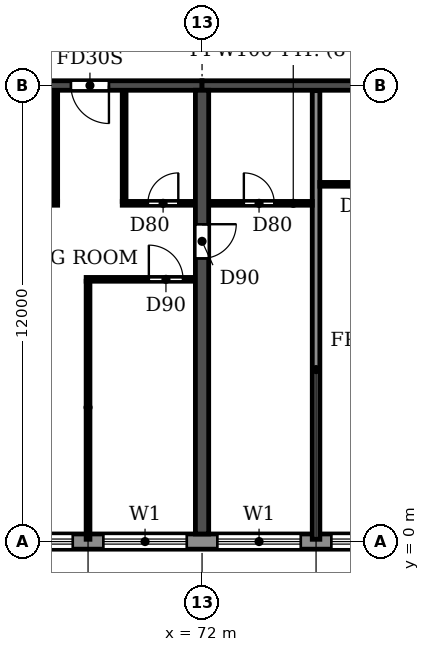
"""IFC4 building model, lengths in metres.
Left out: names, types, materials, properties, quantities, classifications, styles, units other than length and angle.
Written with IfcOpenShell. Run it as: python <this file> out.ifc"""

import sys

from ifc_helpers import new_model, si_unit, direction, frame, frame_2d, origin, place, context, subcontext, project, spatial, rectangle, extrude, element, fill, save


model = new_model("IFC4")
c1 = context("Model", 3, precision=1e-05, world=origin(), true_north=direction((0.0, 1.0)))
c2 = subcontext(c1, "Body", "Model", "MODEL_VIEW")
j1 = project(units=[si_unit("LENGTHUNIT", "METRE"), si_unit("PLANEANGLEUNIT", "RADIAN")], contexts=[c1])
p1 = place(None, origin())
s1 = spatial("IfcSite", under=j1, at=p1, CompositionType="ELEMENT")
p2 = place(p1, origin())
s2 = spatial("IfcBuilding", under=s1, at=p2, CompositionType="ELEMENT")
p3 = place(p2, frame((0.0, 0.0, 102.6)))
s3 = spatial("IfcBuildingStorey", under=s2, at=p3, CompositionType="ELEMENT", Elevation=102.6)
p4 = place(p3, frame((72.0, 0.2, 0.0), z_axis=(0.0, 0.0, 1.0), x_axis=(0.0, 1.0, 0.0)))
e1 = element("IfcWall", 1, at=p4, inside=s3, PredefinedType="SHEAR", context=c2, shape_type="SweptSolid", body=[
    extrude(rectangle(XDim=11.675, YDim=0.35, at=frame_2d((5.837, 0.0))), origin(), (0.0, 0.0, 1.0), 3.0),
])
p5 = place(p4, frame((7.25, 0.0, 0.0)))
e2 = element("IfcOpeningElement", 2, at=p5, cuts=e1, PredefinedType="OPENING", context=c2, shape_type="SweptSolid", body=[
    extrude(rectangle(XDim=0.9, YDim=2.1, at=frame_2d((0.45, 1.05))), frame((0.0, 0.185, 0.0), z_axis=(0.0, -1.0, 0.0), x_axis=(1.0, 0.0, 0.0)), (0.0, 0.0, 1.0), 0.37),
])
p6 = place(p3, frame((66.0, 12.0, 0.0), z_axis=(0.0, 0.0, 1.0), x_axis=(1.0, 0.0, 0.0)))
e3 = element("IfcWall", 3, at=p6, inside=s3, PredefinedType="SHEAR", context=c2, shape_type="SweptSolid", body=[
    extrude(rectangle(XDim=6.0, YDim=0.25, at=frame_2d((3.0, 0.0))), origin(), (0.0, 0.0, 1.0), 2.4),
])
p7 = place(p6, frame((2.55, 0.0, 0.0)))
e4 = element("IfcOpeningElement", 4, at=p7, cuts=e3, PredefinedType="OPENING", context=c2, shape_type="SweptSolid", body=[
    extrude(rectangle(XDim=1.0, YDim=2.1, at=frame_2d((0.5, 1.05))), frame((0.0, 0.135, 0.0), z_axis=(0.0, -1.0, 0.0), x_axis=(1.0, 0.0, 0.0)), (0.0, 0.0, 1.0), 0.27),
])
p8 = place(p3, frame((72.0, 12.0, 0.0), z_axis=(0.0, 0.0, 1.0), x_axis=(1.0, 0.0, 0.0)))
e5 = element("IfcWall", 5, at=p8, inside=s3, PredefinedType="SHEAR", context=c2, shape_type="SweptSolid", body=[
    extrude(rectangle(XDim=6.0, YDim=0.25, at=frame_2d((3.0, 0.0))), origin(), (0.0, 0.0, 1.0), 2.4),
])
p9 = place(p3, frame((10.683, 0.0, 0.0), z_axis=(0.0, 0.0, 1.0), x_axis=(1.0, 0.0, 0.0)))
e6 = element("IfcWall", 6, at=p9, inside=s3, PredefinedType="STANDARD", context=c2, shape_type="SweptSolid", body=[
    extrude(rectangle(XDim=80.634, YDim=0.4, at=frame_2d((40.317, 0.0))), origin(), (0.0, 0.0, 1.0), 3.0),
])
p10 = place(p9, frame((1.717, 0.0, 0.9)))
e7 = element("IfcOpeningElement", 7, at=p10, cuts=e6, PredefinedType="OPENING", context=c2, shape_type="SweptSolid", body=[
    extrude(rectangle(XDim=2.2, YDim=1.5, at=frame_2d((1.1, 0.75))), frame((0.0, 0.21, 0.0), z_axis=(0.0, -1.0, 0.0), x_axis=(1.0, 0.0, 0.0)), (0.0, 0.0, 1.0), 0.42),
])
p11 = place(p9, frame((4.917, 0.0, 0.0)))
e8 = element("IfcOpeningElement", 8, at=p11, cuts=e6, PredefinedType="OPENING", context=c2, shape_type="SweptSolid", body=[
    extrude(rectangle(XDim=1.8, YDim=2.4, at=frame_2d((0.9, 1.2))), frame((0.0, 0.21, 0.0), z_axis=(0.0, -1.0, 0.0), x_axis=(1.0, 0.0, 0.0)), (0.0, 0.0, 1.0), 0.42),
])
p12 = place(p9, frame((7.717, 0.0, 0.9)))
e9 = element("IfcOpeningElement", 9, at=p12, cuts=e6, PredefinedType="OPENING", context=c2, shape_type="SweptSolid", body=[
    extrude(rectangle(XDim=2.2, YDim=1.5, at=frame_2d((1.1, 0.75))), frame((0.0, 0.21, 0.0), z_axis=(0.0, -1.0, 0.0), x_axis=(1.0, 0.0, 0.0)), (0.0, 0.0, 1.0), 0.42),
])
p13 = place(p9, frame((10.717, 0.0, 0.9)))
e10 = element("IfcOpeningElement", 10, at=p13, cuts=e6, PredefinedType="OPENING", context=c2, shape_type="SweptSolid", body=[
    extrude(rectangle(XDim=2.2, YDim=1.5, at=frame_2d((1.1, 0.75))), frame((0.0, 0.21, 0.0), z_axis=(0.0, -1.0, 0.0), x_axis=(1.0, 0.0, 0.0)), (0.0, 0.0, 1.0), 0.42),
])
p14 = place(p9, frame((13.717, 0.0, 0.9)))
e11 = element("IfcOpeningElement", 11, at=p14, cuts=e6, PredefinedType="OPENING", context=c2, shape_type="SweptSolid", body=[
    extrude(rectangle(XDim=2.2, YDim=1.5, at=frame_2d((1.1, 0.75))), frame((0.0, 0.21, 0.0), z_axis=(0.0, -1.0, 0.0), x_axis=(1.0, 0.0, 0.0)), (0.0, 0.0, 1.0), 0.42),
])
p15 = place(p9, frame((16.717, 0.0, 0.9)))
e12 = element("IfcOpeningElement", 12, at=p15, cuts=e6, PredefinedType="OPENING", context=c2, shape_type="SweptSolid", body=[
    extrude(rectangle(XDim=2.2, YDim=1.5, at=frame_2d((1.1, 0.75))), frame((0.0, 0.21, 0.0), z_axis=(0.0, -1.0, 0.0), x_axis=(1.0, 0.0, 0.0)), (0.0, 0.0, 1.0), 0.42),
])
p16 = place(p9, frame((19.717, 0.0, 0.9)))
e13 = element("IfcOpeningElement", 13, at=p16, cuts=e6, PredefinedType="OPENING", context=c2, shape_type="SweptSolid", body=[
    extrude(rectangle(XDim=2.2, YDim=1.5, at=frame_2d((1.1, 0.75))), frame((0.0, 0.21, 0.0), z_axis=(0.0, -1.0, 0.0), x_axis=(1.0, 0.0, 0.0)), (0.0, 0.0, 1.0), 0.42),
])
p17 = place(p9, frame((22.717, 0.0, 0.9)))
e14 = element("IfcOpeningElement", 14, at=p17, cuts=e6, PredefinedType="OPENING", context=c2, shape_type="SweptSolid", body=[
    extrude(rectangle(XDim=2.2, YDim=1.5, at=frame_2d((1.1, 0.75))), frame((0.0, 0.21, 0.0), z_axis=(0.0, -1.0, 0.0), x_axis=(1.0, 0.0, 0.0)), (0.0, 0.0, 1.0), 0.42),
])
p18 = place(p9, frame((25.717, 0.0, 0.9)))
e15 = element("IfcOpeningElement", 15, at=p18, cuts=e6, PredefinedType="OPENING", context=c2, shape_type="SweptSolid", body=[
    extrude(rectangle(XDim=2.2, YDim=1.5, at=frame_2d((1.1, 0.75))), frame((0.0, 0.21, 0.0), z_axis=(0.0, -1.0, 0.0), x_axis=(1.0, 0.0, 0.0)), (0.0, 0.0, 1.0), 0.42),
])
p19 = place(p9, frame((28.917, 0.0, 0.0)))
e16 = element("IfcOpeningElement", 16, at=p19, cuts=e6, PredefinedType="OPENING", context=c2, shape_type="SweptSolid", body=[
    extrude(rectangle(XDim=1.8, YDim=2.4, at=frame_2d((0.9, 1.2))), frame((0.0, 0.21, 0.0), z_axis=(0.0, -1.0, 0.0), x_axis=(1.0, 0.0, 0.0)), (0.0, 0.0, 1.0), 0.42),
])
p20 = place(p9, frame((31.717, 0.0, 0.9)))
e17 = element("IfcOpeningElement", 17, at=p20, cuts=e6, PredefinedType="OPENING", context=c2, shape_type="SweptSolid", body=[
    extrude(rectangle(XDim=2.2, YDim=1.5, at=frame_2d((1.1, 0.75))), frame((0.0, 0.21, 0.0), z_axis=(0.0, -1.0, 0.0), x_axis=(1.0, 0.0, 0.0)), (0.0, 0.0, 1.0), 0.42),
])
p21 = place(p9, frame((34.717, 0.0, 0.9)))
e18 = element("IfcOpeningElement", 18, at=p21, cuts=e6, PredefinedType="OPENING", context=c2, shape_type="SweptSolid", body=[
    extrude(rectangle(XDim=2.2, YDim=1.5, at=frame_2d((1.1, 0.75))), frame((0.0, 0.21, 0.0), z_axis=(0.0, -1.0, 0.0), x_axis=(1.0, 0.0, 0.0)), (0.0, 0.0, 1.0), 0.42),
])
p22 = place(p9, frame((37.717, 0.0, 0.9)))
e19 = element("IfcOpeningElement", 19, at=p22, cuts=e6, PredefinedType="OPENING", context=c2, shape_type="SweptSolid", body=[
    extrude(rectangle(XDim=2.2, YDim=1.5, at=frame_2d((1.1, 0.75))), frame((0.0, 0.21, 0.0), z_axis=(0.0, -1.0, 0.0), x_axis=(1.0, 0.0, 0.0)), (0.0, 0.0, 1.0), 0.42),
])
p23 = place(p9, frame((40.717, 0.0, 0.9)))
e20 = element("IfcOpeningElement", 20, at=p23, cuts=e6, PredefinedType="OPENING", context=c2, shape_type="SweptSolid", body=[
    extrude(rectangle(XDim=2.2, YDim=1.5, at=frame_2d((1.1, 0.75))), frame((0.0, 0.21, 0.0), z_axis=(0.0, -1.0, 0.0), x_axis=(1.0, 0.0, 0.0)), (0.0, 0.0, 1.0), 0.42),
])
p24 = place(p9, frame((43.717, 0.0, 0.9)))
e21 = element("IfcOpeningElement", 21, at=p24, cuts=e6, PredefinedType="OPENING", context=c2, shape_type="SweptSolid", body=[
    extrude(rectangle(XDim=2.2, YDim=1.5, at=frame_2d((1.1, 0.75))), frame((0.0, 0.21, 0.0), z_axis=(0.0, -1.0, 0.0), x_axis=(1.0, 0.0, 0.0)), (0.0, 0.0, 1.0), 0.42),
])
p25 = place(p9, frame((46.717, 0.0, 0.9)))
e22 = element("IfcOpeningElement", 22, at=p25, cuts=e6, PredefinedType="OPENING", context=c2, shape_type="SweptSolid", body=[
    extrude(rectangle(XDim=2.2, YDim=1.5, at=frame_2d((1.1, 0.75))), frame((0.0, 0.21, 0.0), z_axis=(0.0, -1.0, 0.0), x_axis=(1.0, 0.0, 0.0)), (0.0, 0.0, 1.0), 0.42),
])
p26 = place(p9, frame((49.917, 0.0, 0.0)))
e23 = element("IfcOpeningElement", 23, at=p26, cuts=e6, PredefinedType="OPENING", context=c2, shape_type="SweptSolid", body=[
    extrude(rectangle(XDim=1.8, YDim=2.4, at=frame_2d((0.9, 1.2))), frame((0.0, 0.21, 0.0), z_axis=(0.0, -1.0, 0.0), x_axis=(1.0, 0.0, 0.0)), (0.0, 0.0, 1.0), 0.42),
])
p27 = place(p9, frame((52.717, 0.0, 0.9)))
e24 = element("IfcOpeningElement", 24, at=p27, cuts=e6, PredefinedType="OPENING", context=c2, shape_type="SweptSolid", body=[
    extrude(rectangle(XDim=2.2, YDim=1.5, at=frame_2d((1.1, 0.75))), frame((0.0, 0.21, 0.0), z_axis=(0.0, -1.0, 0.0), x_axis=(1.0, 0.0, 0.0)), (0.0, 0.0, 1.0), 0.42),
])
p28 = place(p9, frame((55.717, 0.0, 0.9)))
e25 = element("IfcOpeningElement", 25, at=p28, cuts=e6, PredefinedType="OPENING", context=c2, shape_type="SweptSolid", body=[
    extrude(rectangle(XDim=2.2, YDim=1.5, at=frame_2d((1.1, 0.75))), frame((0.0, 0.21, 0.0), z_axis=(0.0, -1.0, 0.0), x_axis=(1.0, 0.0, 0.0)), (0.0, 0.0, 1.0), 0.42),
])
p29 = place(p9, frame((58.717, 0.0, 0.9)))
e26 = element("IfcOpeningElement", 26, at=p29, cuts=e6, PredefinedType="OPENING", context=c2, shape_type="SweptSolid", body=[
    extrude(rectangle(XDim=2.2, YDim=1.5, at=frame_2d((1.1, 0.75))), frame((0.0, 0.21, 0.0), z_axis=(0.0, -1.0, 0.0), x_axis=(1.0, 0.0, 0.0)), (0.0, 0.0, 1.0), 0.42),
])
p30 = place(p9, frame((61.717, 0.0, 0.9)))
e27 = element("IfcOpeningElement", 27, at=p30, cuts=e6, PredefinedType="OPENING", context=c2, shape_type="SweptSolid", body=[
    extrude(rectangle(XDim=2.2, YDim=1.5, at=frame_2d((1.1, 0.75))), frame((0.0, 0.21, 0.0), z_axis=(0.0, -1.0, 0.0), x_axis=(1.0, 0.0, 0.0)), (0.0, 0.0, 1.0), 0.42),
])
p31 = place(p9, frame((64.717, 0.0, 0.9)))
e28 = element("IfcOpeningElement", 28, at=p31, cuts=e6, PredefinedType="OPENING", context=c2, shape_type="SweptSolid", body=[
    extrude(rectangle(XDim=2.2, YDim=1.5, at=frame_2d((1.1, 0.75))), frame((0.0, 0.21, 0.0), z_axis=(0.0, -1.0, 0.0), x_axis=(1.0, 0.0, 0.0)), (0.0, 0.0, 1.0), 0.42),
])
p32 = place(p9, frame((67.717, 0.0, 0.9)))
e29 = element("IfcOpeningElement", 29, at=p32, cuts=e6, PredefinedType="OPENING", context=c2, shape_type="SweptSolid", body=[
    extrude(rectangle(XDim=2.2, YDim=1.5, at=frame_2d((1.1, 0.75))), frame((0.0, 0.21, 0.0), z_axis=(0.0, -1.0, 0.0), x_axis=(1.0, 0.0, 0.0)), (0.0, 0.0, 1.0), 0.42),
])
p33 = place(p9, frame((70.717, 0.0, 0.9)))
e30 = element("IfcOpeningElement", 30, at=p33, cuts=e6, PredefinedType="OPENING", context=c2, shape_type="SweptSolid", body=[
    extrude(rectangle(XDim=2.2, YDim=1.5, at=frame_2d((1.1, 0.75))), frame((0.0, 0.21, 0.0), z_axis=(0.0, -1.0, 0.0), x_axis=(1.0, 0.0, 0.0)), (0.0, 0.0, 1.0), 0.42),
])
p34 = place(p9, frame((73.717, 0.0, 0.9)))
e31 = element("IfcOpeningElement", 31, at=p34, cuts=e6, PredefinedType="OPENING", context=c2, shape_type="SweptSolid", body=[
    extrude(rectangle(XDim=2.2, YDim=1.5, at=frame_2d((1.1, 0.75))), frame((0.0, 0.21, 0.0), z_axis=(0.0, -1.0, 0.0), x_axis=(1.0, 0.0, 0.0)), (0.0, 0.0, 1.0), 0.42),
])
p35 = place(p9, frame((76.917, 0.0, 0.0)))
e32 = element("IfcOpeningElement", 32, at=p35, cuts=e6, PredefinedType="OPENING", context=c2, shape_type="SweptSolid", body=[
    extrude(rectangle(XDim=1.8, YDim=2.4, at=frame_2d((0.9, 1.2))), frame((0.0, 0.21, 0.0), z_axis=(0.0, -1.0, 0.0), x_axis=(1.0, 0.0, 0.0)), (0.0, 0.0, 1.0), 0.42),
])
p36 = place(p3, frame((75.0, 0.06, 0.0), z_axis=(0.0, 0.0, 1.0), x_axis=(0.0, 1.0, 0.0)))
e33 = element("IfcWall", 33, at=p36, inside=s3, PredefinedType="PARTITIONING", context=c2, shape_type="SweptSolid", body=[
    extrude(rectangle(XDim=11.805, YDim=0.2, at=frame_2d((5.902, 0.0))), origin(), (0.0, 0.0, 1.0), 3.0),
])
p37 = place(p3, frame((68.95, 6.9, 0.0), z_axis=(0.0, 0.0, 1.0), x_axis=(1.0, 0.0, 0.0)))
e34 = element("IfcWall", 34, at=p37, inside=s3, PredefinedType="PARTITIONING", context=c2, shape_type="SweptSolid", body=[
    extrude(rectangle(XDim=2.865, YDim=0.1, at=frame_2d((1.433, 0.0))), origin(), (0.0, 0.0, 1.0), 3.0),
])
p38 = place(p37, frame((1.65, 0.0, 0.0)))
e35 = element("IfcOpeningElement", 35, at=p38, cuts=e34, PredefinedType="OPENING", context=c2, shape_type="SweptSolid", body=[
    extrude(rectangle(XDim=0.9, YDim=2.1, at=frame_2d((0.45, 1.05))), frame((0.0, 0.06, 0.0), z_axis=(0.0, -1.0, 0.0), x_axis=(1.0, 0.0, 0.0)), (0.0, 0.0, 1.0), 0.12),
])
p39 = place(p3, frame((66.185, 8.9, 0.0), z_axis=(0.0, 0.0, 1.0), x_axis=(1.0, 0.0, 0.0)))
e36 = element("IfcWall", 36, at=p39, inside=s3, PredefinedType="PARTITIONING", context=c2, shape_type="SweptSolid", body=[
    extrude(rectangle(XDim=2.015, YDim=0.1, at=frame_2d((1.007, 0.0))), origin(), (0.0, 0.0, 1.0), 3.0),
])
p40 = place(p39, frame((0.44, 0.0, 0.0)))
e37 = element("IfcOpeningElement", 37, at=p40, cuts=e36, PredefinedType="OPENING", context=c2, shape_type="SweptSolid", body=[
    extrude(rectangle(XDim=0.9, YDim=2.1, at=frame_2d((0.45, 1.05))), frame((0.0, 0.06, 0.0), z_axis=(0.0, -1.0, 0.0), x_axis=(1.0, 0.0, 0.0)), (0.0, 0.0, 1.0), 0.12),
])
p41 = place(p3, frame((69.9, 8.9, 0.0), z_axis=(0.0, 0.0, 1.0), x_axis=(1.0, 0.0, 0.0)))
e38 = element("IfcWall", 38, at=p41, inside=s3, PredefinedType="PARTITIONING", context=c2, shape_type="SweptSolid", body=[
    extrude(rectangle(XDim=1.915, YDim=0.1, at=frame_2d((0.958, 0.0))), origin(), (0.0, 0.0, 1.0), 3.0),
])
p42 = place(p41, frame((0.675, 0.0, 0.0)))
e39 = element("IfcOpeningElement", 39, at=p42, cuts=e38, PredefinedType="OPENING", context=c2, shape_type="SweptSolid", body=[
    extrude(rectangle(XDim=0.8, YDim=2.1, at=frame_2d((0.4, 1.05))), frame((0.0, 0.06, 0.0), z_axis=(0.0, -1.0, 0.0), x_axis=(1.0, 0.0, 0.0)), (0.0, 0.0, 1.0), 0.12),
])
p43 = place(p3, frame((72.185, 8.9, 0.0), z_axis=(0.0, 0.0, 1.0), x_axis=(1.0, 0.0, 0.0)))
e40 = element("IfcWall", 40, at=p43, inside=s3, PredefinedType="PARTITIONING", context=c2, shape_type="SweptSolid", body=[
    extrude(rectangle(XDim=2.715, YDim=0.1, at=frame_2d((1.357, 0.0))), origin(), (0.0, 0.0, 1.0), 3.0),
])
p44 = place(p43, frame((0.915, 0.0, 0.0)))
e41 = element("IfcOpeningElement", 41, at=p44, cuts=e40, PredefinedType="OPENING", context=c2, shape_type="SweptSolid", body=[
    extrude(rectangle(XDim=0.8, YDim=2.1, at=frame_2d((0.4, 1.05))), frame((0.0, 0.06, 0.0), z_axis=(0.0, -1.0, 0.0), x_axis=(1.0, 0.0, 0.0)), (0.0, 0.0, 1.0), 0.12),
])
p45 = place(p3, frame((75.1, 9.4, 0.0), z_axis=(0.0, 0.0, 1.0), x_axis=(1.0, 0.0, 0.0)))
e42 = element("IfcWall", 42, at=p45, inside=s3, PredefinedType="PARTITIONING", context=c2, shape_type="SweptSolid", body=[
    extrude(rectangle(XDim=2.715, YDim=0.1, at=frame_2d((1.357, 0.0))), origin(), (0.0, 0.0, 1.0), 3.0),
])
p46 = place(p45, frame((1.0, 0.0, 0.0)))
e43 = element("IfcOpeningElement", 43, at=p46, cuts=e42, PredefinedType="OPENING", context=c2, shape_type="SweptSolid", body=[
    extrude(rectangle(XDim=0.8, YDim=2.1, at=frame_2d((0.4, 1.05))), frame((0.0, 0.06, 0.0), z_axis=(0.0, -1.0, 0.0), x_axis=(1.0, 0.0, 0.0)), (0.0, 0.0, 1.0), 0.12),
])
p47 = place(p3, frame((68.15, 8.95, 0.0), z_axis=(0.0, 0.0, 1.0), x_axis=(0.0, 1.0, 0.0)))
e44 = element("IfcWall", 44, at=p47, inside=s3, PredefinedType="PARTITIONING", context=c2, shape_type="SweptSolid", body=[
    extrude(rectangle(XDim=2.915, YDim=0.1, at=frame_2d((1.458, 0.0))), origin(), (0.0, 0.0, 1.0), 3.0),
])
p48 = place(p3, frame((69.0, 0.06, 0.0), z_axis=(0.0, 0.0, 1.0), x_axis=(0.0, 1.0, 0.0)))
e45 = element("IfcWall", 45, at=p48, inside=s3, PredefinedType="PARTITIONING", context=c2, shape_type="SweptSolid", body=[
    extrude(rectangle(XDim=6.79, YDim=0.1, at=frame_2d((3.395, 0.0))), origin(), (0.0, 0.0, 1.0), 3.0),
])
p49 = place(p3, frame((69.95, 8.95, 0.0), z_axis=(0.0, 0.0, 1.0), x_axis=(0.0, 1.0, 0.0)))
e46 = element("IfcWall", 46, at=p49, inside=s3, PredefinedType="PARTITIONING", context=c2, shape_type="SweptSolid", body=[
    extrude(rectangle(XDim=2.915, YDim=0.1, at=frame_2d((1.458, 0.0))), origin(), (0.0, 0.0, 1.0), 3.0),
])
p50 = place(p28, origin())
e47 = element("IfcWindow", 47, at=p50, inside=s3, PartitioningType="DOUBLE_PANEL_HORIZONTAL", PredefinedType="WINDOW", context=c2, shape_type="SweptSolid", body=[
    extrude(rectangle(XDim=2.2, YDim=1.5, at=frame_2d((1.1, 0.75))), frame((0.0, 0.03, 0.0), z_axis=(0.0, -1.0, 0.0), x_axis=(1.0, 0.0, 0.0)), (0.0, 0.0, 1.0), 0.06),
])
fill(e25, e47)
p51 = place(p29, origin())
e48 = element("IfcWindow", 48, at=p51, inside=s3, PartitioningType="DOUBLE_PANEL_HORIZONTAL", PredefinedType="WINDOW", context=c2, shape_type="SweptSolid", body=[
    extrude(rectangle(XDim=2.2, YDim=1.5, at=frame_2d((1.1, 0.75))), frame((0.0, 0.03, 0.0), z_axis=(0.0, -1.0, 0.0), x_axis=(1.0, 0.0, 0.0)), (0.0, 0.0, 1.0), 0.06),
])
fill(e26, e48)
p52 = place(p30, origin())
e49 = element("IfcWindow", 49, at=p52, inside=s3, PartitioningType="DOUBLE_PANEL_HORIZONTAL", PredefinedType="WINDOW", context=c2, shape_type="SweptSolid", body=[
    extrude(rectangle(XDim=2.2, YDim=1.5, at=frame_2d((1.1, 0.75))), frame((0.0, 0.03, 0.0), z_axis=(0.0, -1.0, 0.0), x_axis=(1.0, 0.0, 0.0)), (0.0, 0.0, 1.0), 0.06),
])
fill(e27, e49)
p53 = place(p31, origin())
e50 = element("IfcWindow", 50, at=p53, inside=s3, PartitioningType="DOUBLE_PANEL_HORIZONTAL", PredefinedType="WINDOW", context=c2, shape_type="SweptSolid", body=[
    extrude(rectangle(XDim=2.2, YDim=1.5, at=frame_2d((1.1, 0.75))), frame((0.0, 0.03, 0.0), z_axis=(0.0, -1.0, 0.0), x_axis=(1.0, 0.0, 0.0)), (0.0, 0.0, 1.0), 0.06),
])
fill(e28, e50)
p54 = place(p44, origin())
e51 = element("IfcDoor", 51, at=p54, inside=s3, OperationType="SINGLE_SWING_LEFT", PredefinedType="DOOR", context=c2, shape_type="SweptSolid", body=[
    extrude(rectangle(XDim=0.8, YDim=2.1, at=frame_2d((0.4, 1.05))), frame((0.0, 0.025, 0.0), z_axis=(0.0, -1.0, 0.0), x_axis=(1.0, 0.0, 0.0)), (0.0, 0.0, 1.0), 0.05),
])
fill(e41, e51)
p55 = place(p7, frame((1.0, 0.0, 0.0), z_axis=(0.0, 0.0, 1.0), x_axis=(-1.0, 0.0, 0.0)))
e52 = element("IfcDoor", 52, at=p55, inside=s3, OperationType="SINGLE_SWING_LEFT", PredefinedType="DOOR", context=c2, shape_type="SweptSolid", body=[
    extrude(rectangle(XDim=1.0, YDim=2.1, at=frame_2d((0.5, 1.05))), frame((0.0, 0.025, 0.0), z_axis=(0.0, -1.0, 0.0), x_axis=(1.0, 0.0, 0.0)), (0.0, 0.0, 1.0), 0.05),
])
fill(e4, e52)
p56 = place(p42, origin())
e53 = element("IfcDoor", 53, at=p56, inside=s3, OperationType="SINGLE_SWING_RIGHT", PredefinedType="DOOR", context=c2, shape_type="SweptSolid", body=[
    extrude(rectangle(XDim=0.8, YDim=2.1, at=frame_2d((0.4, 1.05))), frame((0.0, 0.025, 0.0), z_axis=(0.0, -1.0, 0.0), x_axis=(1.0, 0.0, 0.0)), (0.0, 0.0, 1.0), 0.05),
])
fill(e39, e53)
p57 = place(p38, origin())
e54 = element("IfcDoor", 54, at=p57, inside=s3, OperationType="SINGLE_SWING_LEFT", PredefinedType="DOOR", context=c2, shape_type="SweptSolid", body=[
    extrude(rectangle(XDim=0.9, YDim=2.1, at=frame_2d((0.45, 1.05))), frame((0.0, 0.025, 0.0), z_axis=(0.0, -1.0, 0.0), x_axis=(1.0, 0.0, 0.0)), (0.0, 0.0, 1.0), 0.05),
])
fill(e35, e54)
p58 = place(p5, frame((0.9, 0.0, 0.0), z_axis=(0.0, 0.0, 1.0), x_axis=(-1.0, 0.0, 0.0)))
e55 = element("IfcDoor", 55, at=p58, inside=s3, OperationType="SINGLE_SWING_LEFT", PredefinedType="DOOR", context=c2, shape_type="SweptSolid", body=[
    extrude(rectangle(XDim=0.9, YDim=2.1, at=frame_2d((0.45, 1.05))), frame((0.0, 0.025, 0.0), z_axis=(0.0, -1.0, 0.0), x_axis=(1.0, 0.0, 0.0)), (0.0, 0.0, 1.0), 0.05),
])
fill(e2, e55)
save(model, sys.argv[1])
